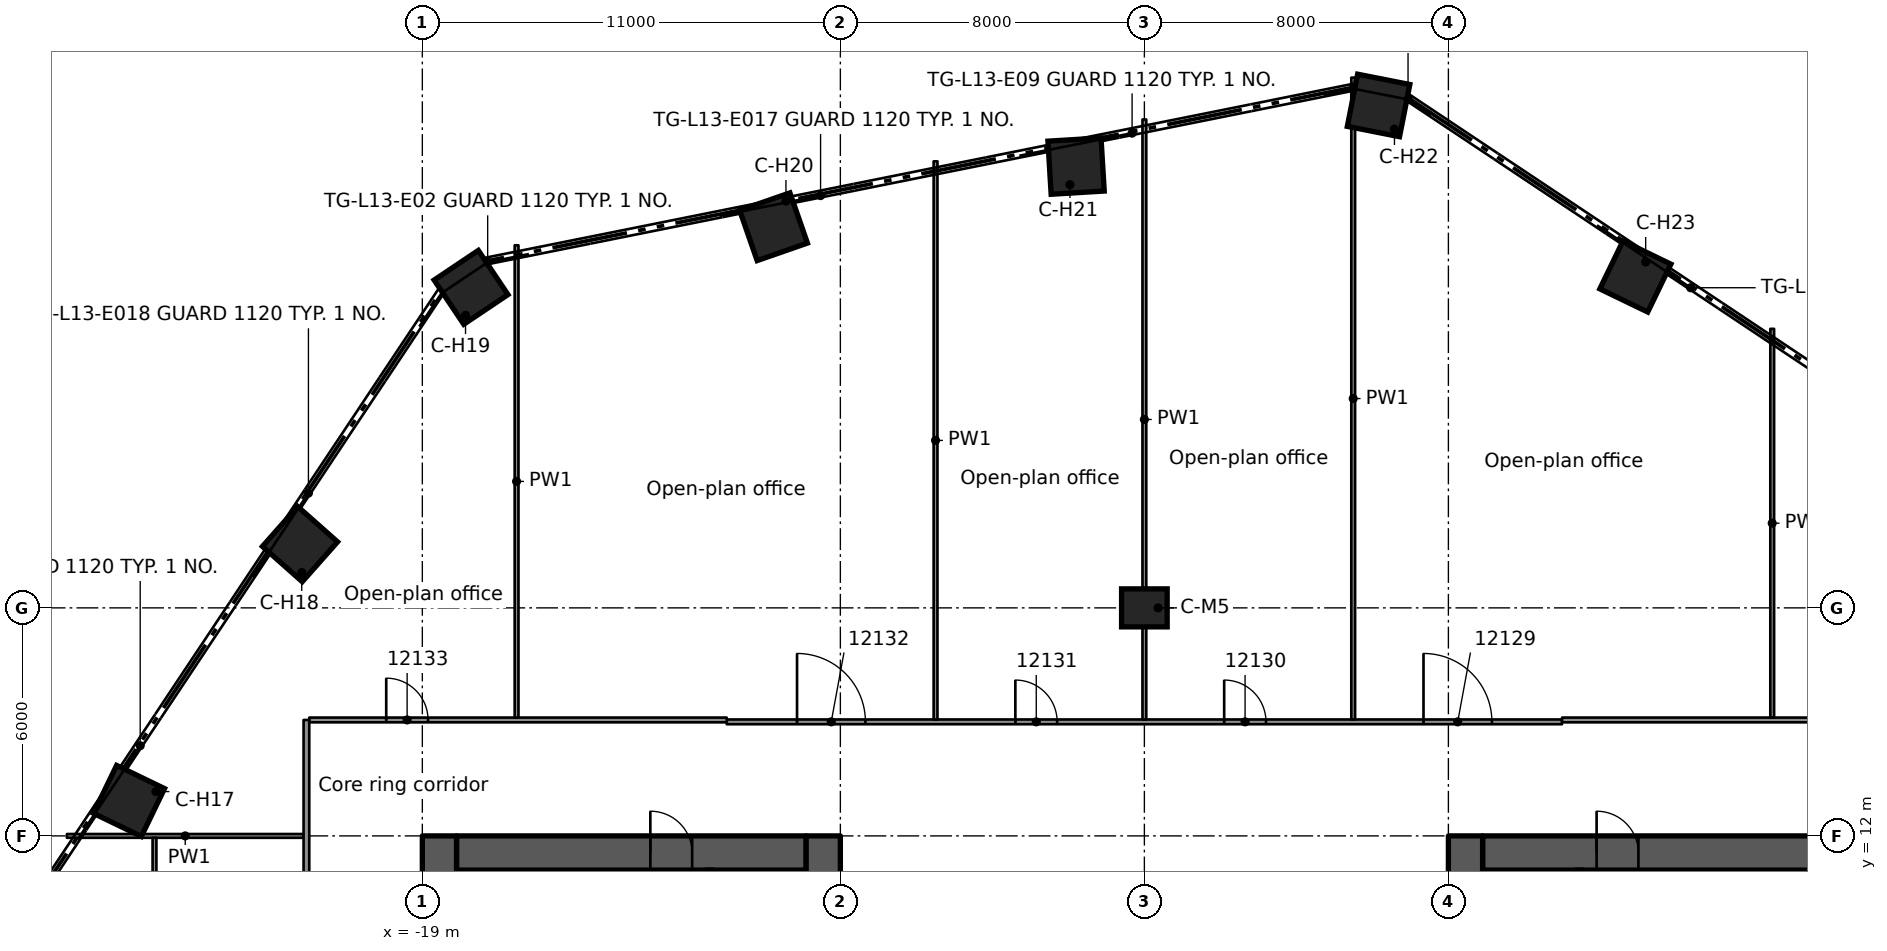
"""IFC4 building model, lengths in metres.
Left out: names, types, materials, properties, quantities, classifications, styles, units other than length and angle.
Written with IfcOpenShell. Run it as: python <this file> out.ifc"""

import sys

from ifc_helpers import new_model, si_unit, direction, frame, frame_2d, origin, origin_2d, place, context, subcontext, project, spatial, rectangle, extrude, element, fill, save


model = new_model("IFC4")
c1 = context("Model", 3, precision=1e-05, world=origin(), true_north=direction((0.0, 1.0)))
c2 = subcontext(c1, "Body", "Model", "MODEL_VIEW")
j1 = project(units=[si_unit("LENGTHUNIT", "METRE"), si_unit("PLANEANGLEUNIT", "RADIAN")], contexts=[c1])
p1 = place(None, origin())
s1 = spatial("IfcSite", under=j1, at=p1, CompositionType="ELEMENT")
p2 = place(p1, origin())
s2 = spatial("IfcBuilding", under=s1, at=p2, CompositionType="ELEMENT")
p3 = place(p2, frame((0.0, 0.0, 58.8)))
s3 = spatial("IfcBuildingStorey", under=s2, at=p3, CompositionType="ELEMENT", Elevation=58.8)
p4 = place(p3, frame((-18.1, 11.55, 0.0), z_axis=(0.0, 0.0, 1.0), x_axis=(1.0, 0.0, 0.0)))
e1 = element("IfcWall", 1, at=p4, inside=s3, PredefinedType="SHEAR", context=c2, shape_type="SweptSolid", body=[
    extrude(rectangle(XDim=9.2, YDim=0.9, at=frame_2d((4.6, 0.0))), origin(), (0.0, 0.0, 1.0), 3.5),
])
p5 = place(p4, frame((5.1, 0.0, 0.0)))
e2 = element("IfcOpeningElement", 2, at=p5, cuts=e1, PredefinedType="OPENING", context=c2, shape_type="SweptSolid", body=[
    extrude(rectangle(XDim=1.1, YDim=2.1, at=frame_2d((0.55, 1.05))), frame((0.0, 0.46, 0.0), z_axis=(0.0, -1.0, 0.0), x_axis=(1.0, 0.0, 0.0)), (0.0, 0.0, 1.0), 0.92),
])
p6 = place(p3, frame((-18.55, -12.0, 0.0), z_axis=(0.0, 0.0, 1.0), x_axis=(0.0, 1.0, 0.0)))
e3 = element("IfcWall", 3, at=p6, inside=s3, PredefinedType="SHEAR", context=c2, shape_type="SweptSolid", body=[
    extrude(rectangle(XDim=24.0, YDim=0.9, at=frame_2d((12.0, 0.0))), origin(), (0.0, 0.0, 1.0), 3.5),
])
p7 = place(p6, frame((10.1, 0.0, 0.0)))
e4 = element("IfcOpeningElement", 4, at=p7, cuts=e3, PredefinedType="OPENING", context=c2, shape_type="SweptSolid", body=[
    extrude(rectangle(XDim=1.8, YDim=2.1, at=frame_2d((0.9, 1.05))), frame((0.0, 0.46, 0.0), z_axis=(0.0, -1.0, 0.0), x_axis=(1.0, 0.0, 0.0)), (0.0, 0.0, 1.0), 0.92),
])
p8 = place(p3, frame((-8.45, -12.0, 0.0), z_axis=(0.0, 0.0, 1.0), x_axis=(0.0, 1.0, 0.0)))
e5 = element("IfcWall", 5, at=p8, inside=s3, PredefinedType="SHEAR", context=c2, shape_type="SweptSolid", body=[
    extrude(rectangle(XDim=24.0, YDim=0.9, at=frame_2d((12.0, 0.0))), origin(), (0.0, 0.0, 1.0), 3.5),
])
p9 = place(p8, frame((9.6, 0.0, 0.0)))
e6 = element("IfcOpeningElement", 6, at=p9, cuts=e5, PredefinedType="OPENING", context=c2, shape_type="SweptSolid", body=[
    extrude(rectangle(XDim=1.8, YDim=2.1, at=frame_2d((0.9, 1.05))), frame((0.0, 0.46, 0.0), z_axis=(0.0, -1.0, 0.0), x_axis=(1.0, 0.0, 0.0)), (0.0, 0.0, 1.0), 0.92),
])
p10 = place(p8, frame((19.65, 0.0, 0.0)))
e7 = element("IfcOpeningElement", 7, at=p10, cuts=e5, PredefinedType="OPENING", context=c2, shape_type="SweptSolid", body=[
    extrude(rectangle(XDim=1.1, YDim=2.1, at=frame_2d((0.55, 1.05))), frame((0.0, 0.46, 0.0), z_axis=(0.0, -1.0, 0.0), x_axis=(1.0, 0.0, 0.0)), (0.0, 0.0, 1.0), 0.92),
])
p11 = place(p3, frame((8.9, 11.55, 0.0), z_axis=(0.0, 0.0, 1.0), x_axis=(1.0, 0.0, 0.0)))
e8 = element("IfcWall", 8, at=p11, inside=s3, PredefinedType="SHEAR", context=c2, shape_type="SweptSolid", body=[
    extrude(rectangle(XDim=9.2, YDim=0.9, at=frame_2d((4.6, 0.0))), origin(), (0.0, 0.0, 1.0), 3.5),
])
p12 = place(p11, frame((3.0, 0.0, 0.0)))
e9 = element("IfcOpeningElement", 9, at=p12, cuts=e8, PredefinedType="OPENING", context=c2, shape_type="SweptSolid", body=[
    extrude(rectangle(XDim=1.1, YDim=2.1, at=frame_2d((0.55, 1.05))), frame((0.0, 0.46, 0.0), z_axis=(0.0, -1.0, 0.0), x_axis=(1.0, 0.0, 0.0)), (0.0, 0.0, 1.0), 0.92),
])
p13 = place(p3, frame((8.45, -12.0, 0.0), z_axis=(0.0, 0.0, 1.0), x_axis=(0.0, 1.0, 0.0)))
e10 = element("IfcWall", 10, at=p13, inside=s3, PredefinedType="SHEAR", context=c2, shape_type="SweptSolid", body=[
    extrude(rectangle(XDim=24.0, YDim=0.9, at=frame_2d((12.0, 0.0))), origin(), (0.0, 0.0, 1.0), 3.5),
])
p14 = place(p13, frame((12.6, 0.0, 0.0)))
e11 = element("IfcOpeningElement", 11, at=p14, cuts=e10, PredefinedType="OPENING", context=c2, shape_type="SweptSolid", body=[
    extrude(rectangle(XDim=1.8, YDim=2.1, at=frame_2d((0.9, 1.05))), frame((0.0, 0.46, 0.0), z_axis=(0.0, -1.0, 0.0), x_axis=(1.0, 0.0, 0.0)), (0.0, 0.0, 1.0), 0.92),
])
p15 = place(p13, frame((3.25, 0.0, 0.0)))
e12 = element("IfcOpeningElement", 12, at=p15, cuts=e10, PredefinedType="OPENING", context=c2, shape_type="SweptSolid", body=[
    extrude(rectangle(XDim=1.1, YDim=2.1, at=frame_2d((0.55, 1.05))), frame((0.0, 0.46, 0.0), z_axis=(0.0, -1.0, 0.0), x_axis=(1.0, 0.0, 0.0)), (0.0, 0.0, 1.0), 0.92),
])
for number, where, z_axis, x_axis in (
    (13, (-26.719, 12.92, 0.0), (0.0, 0.0, 1.0), (-0.9, 0.435, 0.0)),
    (14, (-22.219, 19.677, 0.0), (0.0, 0.0, 1.0), (-0.749, 0.663, 0.0)),
    (15, (-17.718, 26.434, 0.0), (0.0, 0.0, 1.0), (-0.557, 0.831, 0.0)),
    (16, (-9.758, 28.029, 0.0), (0.0, 0.0, 1.0), (-0.329, 0.944, 0.0)),
    (17, (-1.797, 29.624, 0.0), (0.0, 0.0, 1.0), (-0.061, 0.998, 0.0)),
    (18, (6.163, 31.22, 0.0), (0.0, 0.0, 1.0), (0.194, 0.981, 0.0)),
    (19, (12.92, 26.719, 0.0), (0.0, 0.0, 1.0), (0.435, 0.9, 0.0)),
):
    element("IfcColumn", number, at=place(p3, frame(where, z_axis=z_axis, x_axis=x_axis)), inside=s3, PredefinedType="COLUMN", context=c2, shape_type="SweptSolid", body=[
        extrude(rectangle(XDim=1.4, YDim=1.4, at=origin_2d()), origin(), (0.0, 0.0, 1.0), 3.5),
    ])
p16 = place(p3, frame((0.0, 18.0, 0.0), z_axis=(0.0, 0.0, 1.0), x_axis=(1.0, 0.0, 0.0)))
e20 = element("IfcColumn", 20, at=p16, inside=s3, PredefinedType="COLUMN", context=c2, shape_type="SweptSolid", body=[
    extrude(rectangle(XDim=1.2, YDim=1.0, at=origin_2d()), origin(), (0.0, 0.0, 1.0), 3.5),
])
p17 = place(p3, frame((-11.44, 6.975, 0.0), z_axis=(0.0, 0.0, 1.0), x_axis=(0.0, 1.0, 0.0)))
e21 = element("IfcWall", 21, at=p17, inside=s3, PredefinedType="SOLIDWALL", context=c2, shape_type="SweptSolid", body=[
    extrude(rectangle(XDim=4.125, YDim=0.2, at=frame_2d((2.062, 0.0))), origin(), (0.0, 0.0, 1.0), 3.09),
])
p18 = place(p17, frame((2.1, 0.0, 0.0)))
e22 = element("IfcOpeningElement", 22, at=p18, cuts=e21, PredefinedType="OPENING", context=c2, shape_type="SweptSolid", body=[
    extrude(rectangle(XDim=1.1, YDim=2.1, at=frame_2d((0.55, 1.05))), frame((0.0, 0.11, 0.0), z_axis=(0.0, -1.0, 0.0), x_axis=(1.0, 0.0, 0.0)), (0.0, 0.0, 1.0), 0.22),
])
p19 = place(p3, frame((11.44, 11.1, 0.0), z_axis=(0.0, 0.0, 1.0), x_axis=(0.0, -1.0, 0.0)))
e23 = element("IfcWall", 23, at=p19, inside=s3, PredefinedType="SOLIDWALL", context=c2, shape_type="SweptSolid", body=[
    extrude(rectangle(XDim=4.125, YDim=0.2, at=frame_2d((2.062, 0.0))), origin(), (0.0, 0.0, 1.0), 3.09),
])
p20 = place(p3, frame((-28.353, 12.0, 0.0), z_axis=(0.0, 0.0, 1.0), x_axis=(1.0, 0.0, 0.0)))
e24 = element("IfcWall", 24, at=p20, inside=s3, PredefinedType="PARTITIONING", context=c2, shape_type="SweptSolid", body=[
    extrude(rectangle(XDim=6.228, YDim=0.1, at=frame_2d((3.114, 0.0))), origin(), (0.0, 0.0, 1.0), 3.08),
])
p21 = place(p3, frame((-10.99, 15.001, 0.0), z_axis=(0.0, 0.0, 1.0), x_axis=(1.0, 0.0, 0.0)))
e25 = element("IfcWall", 25, at=p21, inside=s3, PredefinedType="PARTITIONING", context=c2, shape_type="SweptSolid", body=[
    extrude(rectangle(XDim=21.98, YDim=0.125, at=frame_2d((10.99, 0.0))), origin(), (0.0, 0.0, 1.0), 3.08),
])
p22 = place(p21, frame((18.335, 0.0, 0.0)))
e26 = element("IfcOpeningElement", 26, at=p22, cuts=e25, PredefinedType="OPENING", context=c2, shape_type="SweptSolid", body=[
    extrude(rectangle(XDim=1.8, YDim=2.1, at=frame_2d((0.9, 1.05))), frame((0.0, 0.073, 0.0), z_axis=(0.0, -1.0, 0.0), x_axis=(1.0, 0.0, 0.0)), (0.0, 0.0, 1.0), 0.145),
])
p23 = place(p21, frame((13.09, 0.0, 0.0)))
e27 = element("IfcOpeningElement", 27, at=p23, cuts=e25, PredefinedType="OPENING", context=c2, shape_type="SweptSolid", body=[
    extrude(rectangle(XDim=1.1, YDim=2.1, at=frame_2d((0.55, 1.05))), frame((0.0, 0.073, 0.0), z_axis=(0.0, -1.0, 0.0), x_axis=(1.0, 0.0, 0.0)), (0.0, 0.0, 1.0), 0.145),
])
p24 = place(p21, frame((7.595, 0.0, 0.0)))
e28 = element("IfcOpeningElement", 28, at=p24, cuts=e25, PredefinedType="OPENING", context=c2, shape_type="SweptSolid", body=[
    extrude(rectangle(XDim=1.1, YDim=2.1, at=frame_2d((0.55, 1.05))), frame((0.0, 0.073, 0.0), z_axis=(0.0, -1.0, 0.0), x_axis=(1.0, 0.0, 0.0)), (0.0, 0.0, 1.0), 0.145),
])
p25 = place(p21, frame((1.85, 0.0, 0.0)))
e29 = element("IfcOpeningElement", 29, at=p25, cuts=e25, PredefinedType="OPENING", context=c2, shape_type="SweptSolid", body=[
    extrude(rectangle(XDim=1.8, YDim=2.1, at=frame_2d((0.9, 1.05))), frame((0.0, 0.073, 0.0), z_axis=(0.0, -1.0, 0.0), x_axis=(1.0, 0.0, 0.0)), (0.0, 0.0, 1.0), 0.145),
])
p26 = place(p3, frame((-21.975, 15.051, 0.0), z_axis=(0.0, 0.0, 1.0), x_axis=(1.0, 0.0, 0.0)))
e30 = element("IfcWall", 30, at=p26, inside=s3, PredefinedType="PARTITIONING", context=c2, shape_type="SweptSolid", body=[
    extrude(rectangle(XDim=10.984, YDim=0.125, at=frame_2d((5.492, 0.0))), origin(), (0.0, 0.0, 1.0), 3.08),
])
p27 = place(p26, frame((2.025, 0.0, 0.0)))
e31 = element("IfcOpeningElement", 31, at=p27, cuts=e30, PredefinedType="OPENING", context=c2, shape_type="SweptSolid", body=[
    extrude(rectangle(XDim=1.1, YDim=2.1, at=frame_2d((0.55, 1.05))), frame((0.0, 0.073, 0.0), z_axis=(0.0, -1.0, 0.0), x_axis=(1.0, 0.0, 0.0)), (0.0, 0.0, 1.0), 0.145),
])
p28 = place(p3, frame((10.991, 15.051, 0.0), z_axis=(0.0, 0.0, 1.0), x_axis=(1.0, 0.0, 0.0)))
e32 = element("IfcWall", 32, at=p28, inside=s3, PredefinedType="PARTITIONING", context=c2, shape_type="SweptSolid", body=[
    extrude(rectangle(XDim=10.997, YDim=0.125, at=frame_2d((5.499, 0.0))), origin(), (0.0, 0.0, 1.0), 3.08),
])
p29 = place(p28, frame((7.88, 0.0, 0.0)))
e33 = element("IfcOpeningElement", 33, at=p29, cuts=e32, PredefinedType="OPENING", context=c2, shape_type="SweptSolid", body=[
    extrude(rectangle(XDim=0.9, YDim=2.1, at=frame_2d((0.45, 1.05))), frame((0.0, 0.073, 0.0), z_axis=(0.0, -1.0, 0.0), x_axis=(1.0, 0.0, 0.0)), (0.0, 0.0, 1.0), 0.145),
])
p30 = place(p3, frame((16.521, 15.114, 0.0), z_axis=(0.0, 0.0, 1.0), x_axis=(0.0, 1.0, 0.0)))
e34 = element("IfcWall", 34, at=p30, inside=s3, PredefinedType="PARTITIONING", context=c2, shape_type="SweptSolid", body=[
    extrude(rectangle(XDim=10.228, YDim=0.1, at=frame_2d((5.114, 0.0))), origin(), (0.0, 0.0, 1.0), 3.08),
])
p31 = place(p3, frame((5.495, 15.063, 0.0), z_axis=(0.0, 0.0, 1.0), x_axis=(0.0, 1.0, 0.0)))
e35 = element("IfcWall", 35, at=p31, inside=s3, PredefinedType="PARTITIONING", context=c2, shape_type="SweptSolid", body=[
    extrude(rectangle(XDim=16.889, YDim=0.1, at=frame_2d((8.444, 0.0))), origin(), (0.0, 0.0, 1.0), 3.08),
])
p32 = place(p3, frame((0.0, 15.063, 0.0), z_axis=(0.0, 0.0, 1.0), x_axis=(0.0, 1.0, 0.0)))
e36 = element("IfcWall", 36, at=p32, inside=s3, PredefinedType="PARTITIONING", context=c2, shape_type="SweptSolid", body=[
    extrude(rectangle(XDim=15.788, YDim=0.1, at=frame_2d((7.894, 0.0))), origin(), (0.0, 0.0, 1.0), 3.08),
])
p33 = place(p3, frame((-5.495, 15.063, 0.0), z_axis=(0.0, 0.0, 1.0), x_axis=(0.0, 1.0, 0.0)))
e37 = element("IfcWall", 37, at=p33, inside=s3, PredefinedType="PARTITIONING", context=c2, shape_type="SweptSolid", body=[
    extrude(rectangle(XDim=14.687, YDim=0.1, at=frame_2d((7.344, 0.0))), origin(), (0.0, 0.0, 1.0), 3.08),
])
p34 = place(p3, frame((-16.52, 15.114, 0.0), z_axis=(0.0, 0.0, 1.0), x_axis=(0.0, 1.0, 0.0)))
e38 = element("IfcWall", 38, at=p34, inside=s3, PredefinedType="PARTITIONING", context=c2, shape_type="SweptSolid", body=[
    extrude(rectangle(XDim=12.427, YDim=0.1, at=frame_2d((6.213, 0.0))), origin(), (0.0, 0.0, 1.0), 3.08),
])
p35 = place(p3, frame((-22.05, -13.969, 0.0), z_axis=(0.0, 0.0, 1.0), x_axis=(0.0, 1.0, 0.0)))
e39 = element("IfcWall", 39, at=p35, inside=s3, PredefinedType="PARTITIONING", context=c2, shape_type="SweptSolid", body=[
    extrude(rectangle(XDim=29.02, YDim=0.15, at=frame_2d((14.51, 0.0))), origin(), (0.0, 0.0, 1.0), 3.08),
])
p36 = place(p35, frame((10.069, 0.0, 0.0)))
e40 = element("IfcOpeningElement", 40, at=p36, cuts=e39, PredefinedType="OPENING", context=c2, shape_type="SweptSolid", body=[
    extrude(rectangle(XDim=1.8, YDim=2.1, at=frame_2d((0.9, 1.05))), frame((0.0, 0.085, 0.0), z_axis=(0.0, -1.0, 0.0), x_axis=(1.0, 0.0, 0.0)), (0.0, 0.0, 1.0), 0.17),
])
p37 = place(p35, frame((22.57, 0.0, 0.0)))
e41 = element("IfcOpeningElement", 41, at=p37, cuts=e39, PredefinedType="OPENING", context=c2, shape_type="SweptSolid", body=[
    extrude(rectangle(XDim=0.9, YDim=2.1, at=frame_2d((0.45, 1.05))), frame((0.0, 0.085, 0.0), z_axis=(0.0, -1.0, 0.0), x_axis=(1.0, 0.0, 0.0)), (0.0, 0.0, 1.0), 0.17),
])
p38 = place(p3, frame((-26.048, 6.001, 0.0), z_axis=(0.0, 0.0, 1.0), x_axis=(0.0, 1.0, 0.0)))
e42 = element("IfcWall", 42, at=p38, inside=s3, PredefinedType="PARTITIONING", context=c2, shape_type="SweptSolid", body=[
    extrude(rectangle(XDim=5.949, YDim=0.1, at=frame_2d((2.975, 0.0))), origin(), (0.0, 0.0, 1.0), 3.08),
])
p39 = place(p5, origin())
e43 = element("IfcDoor", 43, at=p39, inside=s3, OperationType="SINGLE_SWING_RIGHT", PredefinedType="DOOR", context=c2, shape_type="SweptSolid", body=[
    extrude(rectangle(XDim=1.1, YDim=2.1, at=frame_2d((0.55, 1.05))), frame((0.0, 0.025, 0.0), z_axis=(0.0, -1.0, 0.0), x_axis=(1.0, 0.0, 0.0)), (0.0, 0.0, 1.0), 0.05),
])
fill(e2, e43)
p40 = place(p12, origin())
e44 = element("IfcDoor", 44, at=p40, inside=s3, OperationType="SINGLE_SWING_LEFT", PredefinedType="DOOR", context=c2, shape_type="SweptSolid", body=[
    extrude(rectangle(XDim=1.1, YDim=2.1, at=frame_2d((0.55, 1.05))), frame((0.0, 0.025, 0.0), z_axis=(0.0, -1.0, 0.0), x_axis=(1.0, 0.0, 0.0)), (0.0, 0.0, 1.0), 0.05),
])
fill(e9, e44)
p41 = place(p22, origin())
e45 = element("IfcDoor", 45, at=p41, inside=s3, OperationType="DOUBLE_DOOR_SINGLE_SWING", PredefinedType="DOOR", context=c2, shape_type="SweptSolid", body=[
    extrude(rectangle(XDim=1.8, YDim=2.1, at=frame_2d((0.9, 1.05))), frame((0.0, 0.025, 0.0), z_axis=(0.0, -1.0, 0.0), x_axis=(1.0, 0.0, 0.0)), (0.0, 0.0, 1.0), 0.05),
])
fill(e26, e45)
p42 = place(p23, origin())
e46 = element("IfcDoor", 46, at=p42, inside=s3, OperationType="SINGLE_SWING_RIGHT", PredefinedType="DOOR", context=c2, shape_type="SweptSolid", body=[
    extrude(rectangle(XDim=1.1, YDim=2.1, at=frame_2d((0.55, 1.05))), frame((0.0, 0.025, 0.0), z_axis=(0.0, -1.0, 0.0), x_axis=(1.0, 0.0, 0.0)), (0.0, 0.0, 1.0), 0.05),
])
fill(e27, e46)
p43 = place(p24, origin())
e47 = element("IfcDoor", 47, at=p43, inside=s3, OperationType="SINGLE_SWING_LEFT", PredefinedType="DOOR", context=c2, shape_type="SweptSolid", body=[
    extrude(rectangle(XDim=1.1, YDim=2.1, at=frame_2d((0.55, 1.05))), frame((0.0, 0.025, 0.0), z_axis=(0.0, -1.0, 0.0), x_axis=(1.0, 0.0, 0.0)), (0.0, 0.0, 1.0), 0.05),
])
fill(e28, e47)
p44 = place(p25, origin())
e48 = element("IfcDoor", 48, at=p44, inside=s3, OperationType="DOUBLE_DOOR_SINGLE_SWING", PredefinedType="DOOR", context=c2, shape_type="SweptSolid", body=[
    extrude(rectangle(XDim=1.8, YDim=2.1, at=frame_2d((0.9, 1.05))), frame((0.0, 0.025, 0.0), z_axis=(0.0, -1.0, 0.0), x_axis=(1.0, 0.0, 0.0)), (0.0, 0.0, 1.0), 0.05),
])
fill(e29, e48)
p45 = place(p27, origin())
e49 = element("IfcDoor", 49, at=p45, inside=s3, OperationType="SINGLE_SWING_LEFT", PredefinedType="DOOR", context=c2, shape_type="SweptSolid", body=[
    extrude(rectangle(XDim=1.1, YDim=2.1, at=frame_2d((0.55, 1.05))), frame((0.0, 0.025, 0.0), z_axis=(0.0, -1.0, 0.0), x_axis=(1.0, 0.0, 0.0)), (0.0, 0.0, 1.0), 0.05),
])
fill(e31, e49)
save(model, sys.argv[1])
